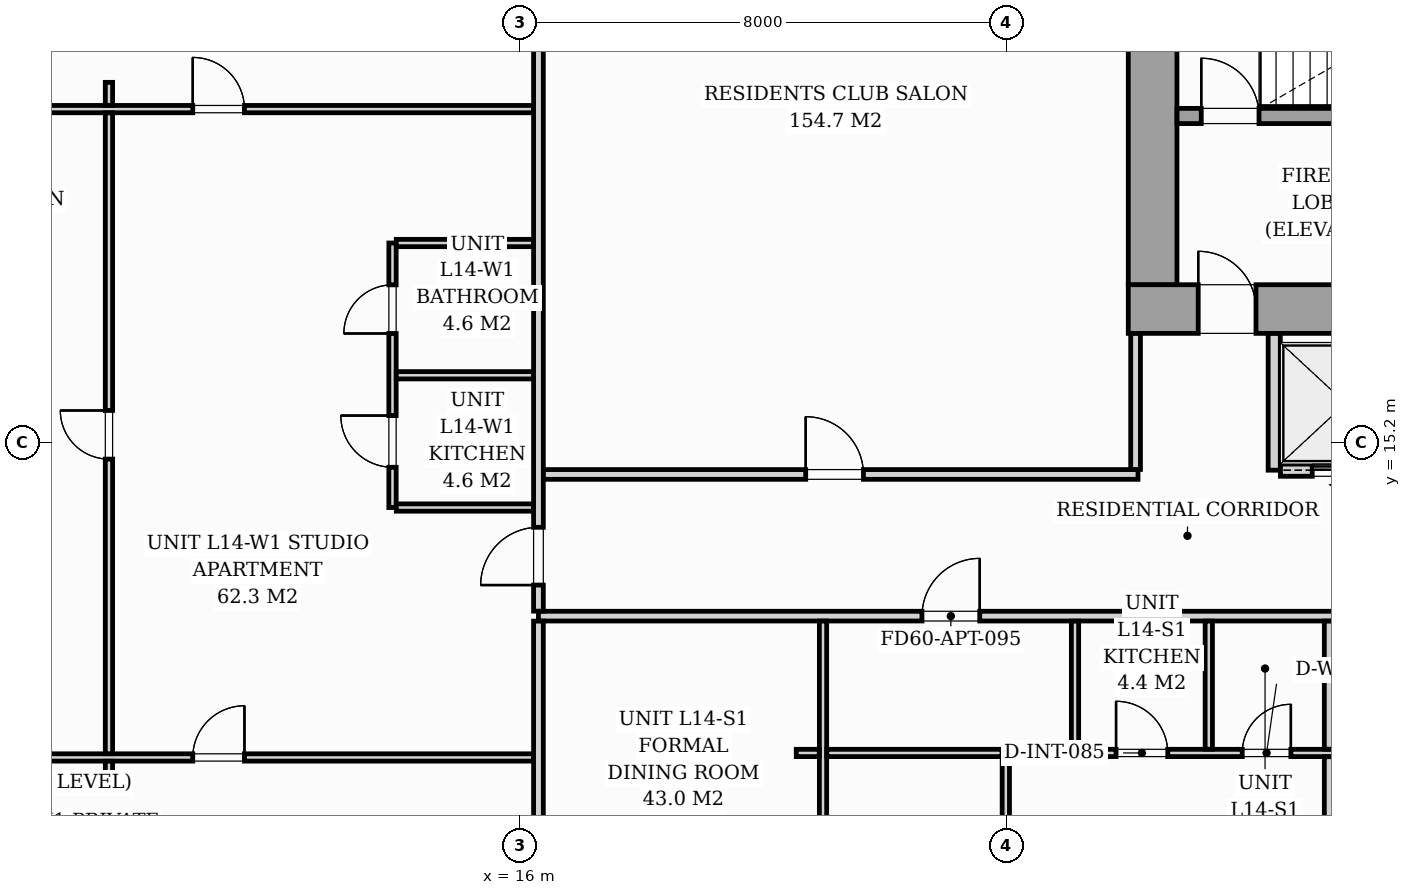
"""IFC4 building model, lengths in metres.
Left out: names, types, materials, properties, quantities, classifications, styles, units other than length and angle.
Written with IfcOpenShell. Run it as: python <this file> out.ifc"""

import sys

from ifc_helpers import new_model, si_unit, direction, frame, frame_2d, origin, origin_2d, place, context, subcontext, project, spatial, rectangle, i_section, extrude, source, transform, mapped, element, fill, save


model = new_model("IFC4")
c1 = context("Model", 3, precision=1e-05, world=origin(), true_north=direction((0.0, 1.0)))
c2 = subcontext(c1, "Body", "Model", "MODEL_VIEW")
j1 = project(units=[si_unit("LENGTHUNIT", "METRE"), si_unit("PLANEANGLEUNIT", "RADIAN")], contexts=[c1])
p1 = place(None, origin())
s1 = spatial("IfcSite", under=j1, at=p1, CompositionType="ELEMENT")
p2 = place(p1, origin())
s2 = spatial("IfcBuilding", under=s1, at=p2, CompositionType="ELEMENT")
p3 = place(p2, frame((0.0, 0.0, 51.8)))
s3 = spatial("IfcBuildingStorey", under=s2, at=p3, CompositionType="ELEMENT", Elevation=51.8)
m1 = source(origin(), c2, "Body", "SweptSolid", [
    extrude(i_section(OverallWidth=0.437, OverallDepth=0.514, WebThickness=0.061, FlangeThickness=0.097, FilletRadius=0.018, at=origin_2d()), origin(), (0.0, 0.0, 1.0), 3.196),
])
p4 = place(p3, frame((26.4, 17.4, 0.002), z_axis=(0.0, 0.0, 1.0), x_axis=(1.0, 0.0, 0.0)))
e1 = element("IfcColumn", 1, at=p4, inside=s3, PredefinedType="PILASTER", context=c2, shape_type="MappedRepresentation", body=[
    mapped(m1, transform((0.0, 0.0, 0.0), scale=1.0)),
])
p5 = place(p3, frame((26.0, 17.4, 0.0), z_axis=(0.0, 0.0, 1.0), x_axis=(1.0, 0.0, 0.0)))
e2 = element("IfcWall", 2, at=p5, inside=s3, PredefinedType="SHEAR", context=c2, shape_type="SweptSolid", body=[
    extrude(rectangle(XDim=20.0, YDim=0.8, at=frame_2d((10.0, 0.0))), origin(), (0.0, 0.0, 1.0), 3.2),
])
p6 = place(p5, frame((1.15, 0.0, 0.0)))
e3 = element("IfcOpeningElement", 3, at=p6, cuts=e2, PredefinedType="OPENING", context=c2, shape_type="SweptSolid", body=[
    extrude(rectangle(XDim=0.95, YDim=2.06, at=frame_2d((0.475, 1.03))), frame((0.0, 0.41, 0.0), z_axis=(0.0, -1.0, 0.0), x_axis=(1.0, 0.0, 0.0)), (0.0, 0.0, 1.0), 0.82),
])
p7 = place(p5, frame((9.58, 0.0, 0.0)))
e4 = element("IfcOpeningElement", 4, at=p7, cuts=e2, PredefinedType="OPENING", context=c2, shape_type="SweptSolid", body=[
    extrude(rectangle(XDim=0.85, YDim=2.0, at=frame_2d((0.425, 1.0))), frame((0.0, 0.41, 0.0), z_axis=(0.0, -1.0, 0.0), x_axis=(1.0, 0.0, 0.0)), (0.0, 0.0, 1.0), 0.82),
])
p8 = place(p5, frame((17.75, 0.0, 0.0)))
e5 = element("IfcOpeningElement", 5, at=p8, cuts=e2, PredefinedType="OPENING", context=c2, shape_type="SweptSolid", body=[
    extrude(rectangle(XDim=0.95, YDim=2.06, at=frame_2d((0.475, 1.03))), frame((0.0, 0.41, 0.0), z_axis=(0.0, -1.0, 0.0), x_axis=(1.0, 0.0, 0.0)), (0.0, 0.0, 1.0), 0.82),
])
p9 = place(p3, frame((26.4, 17.802, 0.0), z_axis=(0.0, 0.0, 1.0), x_axis=(0.0, 1.0, 0.0)))
e6 = element("IfcWall", 6, at=p9, inside=s3, PredefinedType="SHEAR", context=c2, shape_type="SweptSolid", body=[
    extrude(rectangle(XDim=5.796, YDim=0.8, at=frame_2d((2.898, 0.0))), origin(), (0.0, 0.0, 1.0), 3.2),
])
p10 = place(p3, frame((26.802, 20.575, 0.0), z_axis=(0.0, 0.0, 1.0), x_axis=(1.0, 0.0, 0.0)))
e7 = element("IfcWall", 7, at=p10, inside=s3, PredefinedType="SOLIDWALL", context=c2, shape_type="SweptSolid", body=[
    extrude(rectangle(XDim=8.148, YDim=0.25, at=frame_2d((4.074, 0.0))), origin(), (0.0, 0.0, 1.0), 3.2),
])
p11 = place(p10, frame((0.398, 0.0, 0.0)))
e8 = element("IfcOpeningElement", 8, at=p11, cuts=e7, PredefinedType="OPENING", context=c2, shape_type="SweptSolid", body=[
    extrude(rectangle(XDim=0.95, YDim=2.06, at=frame_2d((0.475, 1.03))), frame((0.0, 0.135, 0.0), z_axis=(0.0, -1.0, 0.0), x_axis=(1.0, 0.0, 0.0)), (0.0, 0.0, 1.0), 0.27),
])
p12 = place(p3, frame((28.4, 14.75, 0.0), z_axis=(0.0, 0.0, 1.0), x_axis=(0.0, 1.0, 0.0)))
e9 = element("IfcWall", 9, at=p12, inside=s3, PredefinedType="PARTITIONING", context=c2, shape_type="SweptSolid", body=[
    extrude(rectangle(XDim=2.248, YDim=0.2, at=frame_2d((1.124, 0.0))), origin(), (0.0, 0.0, 1.0), 2.94),
])
p13 = place(p3, frame((28.502, 14.75, 0.0), z_axis=(0.0, 0.0, 1.0), x_axis=(1.0, 0.0, 0.0)))
e10 = element("IfcWall", 10, at=p13, inside=s3, PredefinedType="PARTITIONING", context=c2, shape_type="SweptSolid", body=[
    extrude(rectangle(XDim=2.146, YDim=0.2, at=frame_2d((1.073, 0.0))), origin(), (0.0, 0.0, 1.0), 2.94),
])
p14 = place(p13, frame((0.523, 0.0, 0.0)))
e11 = element("IfcOpeningElement", 11, at=p14, cuts=e10, PredefinedType="OPENING", context=c2, shape_type="SweptSolid", body=[
    extrude(rectangle(XDim=1.05, YDim=2.08, at=frame_2d((0.525, 1.04))), frame((0.0, 0.11, 0.0), z_axis=(0.0, -1.0, 0.0), x_axis=(1.0, 0.0, 0.0)), (0.0, 0.0, 1.0), 0.22),
])
p15 = place(p3, frame((16.3, 12.35, 0.0), z_axis=(0.0, 0.0, 1.0), x_axis=(1.0, 0.0, 0.0)))
e12 = element("IfcWall", 12, at=p15, inside=s3, PredefinedType="PARTITIONING", context=c2, shape_type="SweptSolid", body=[
    extrude(rectangle(XDim=35.2, YDim=0.16, at=frame_2d((17.6, 0.0))), origin(), (0.0, 0.0, 1.0), 2.94),
])
p16 = place(p15, frame((6.307, 0.0, 0.0)))
e13 = element("IfcOpeningElement", 13, at=p16, cuts=e12, PredefinedType="OPENING", context=c2, shape_type="SweptSolid", body=[
    extrude(rectangle(XDim=0.95, YDim=2.06, at=frame_2d((0.475, 1.03))), frame((0.0, 0.09, 0.0), z_axis=(0.0, -1.0, 0.0), x_axis=(1.0, 0.0, 0.0)), (0.0, 0.0, 1.0), 0.18),
])
p17 = place(p15, frame((18.392, 0.0, 0.0)))
e14 = element("IfcOpeningElement", 14, at=p17, cuts=e12, PredefinedType="OPENING", context=c2, shape_type="SweptSolid", body=[
    extrude(rectangle(XDim=0.95, YDim=2.06, at=frame_2d((0.475, 1.03))), frame((0.0, 0.09, 0.0), z_axis=(0.0, -1.0, 0.0), x_axis=(1.0, 0.0, 0.0)), (0.0, 0.0, 1.0), 0.18),
])
p18 = place(p15, frame((29.304, 0.0, 0.0)))
e15 = element("IfcOpeningElement", 15, at=p18, cuts=e12, PredefinedType="OPENING", context=c2, shape_type="SweptSolid", body=[
    extrude(rectangle(XDim=0.95, YDim=2.06, at=frame_2d((0.475, 1.03))), frame((0.0, 0.09, 0.0), z_axis=(0.0, -1.0, 0.0), x_axis=(1.0, 0.0, 0.0)), (0.0, 0.0, 1.0), 0.18),
])
p19 = place(p3, frame((16.3, 2.962, 0.0), z_axis=(0.0, 0.0, 1.0), x_axis=(0.0, 1.0, 0.0)))
e16 = element("IfcWall", 16, at=p19, inside=s3, PredefinedType="PARTITIONING", context=c2, shape_type="SweptSolid", body=[
    extrude(rectangle(XDim=9.306, YDim=0.16, at=frame_2d((4.653, 0.0))), origin(), (0.0, 0.0, 1.0), 2.94),
])
p20 = place(p3, frame((16.3, 12.432, 0.0), z_axis=(0.0, 0.0, 1.0), x_axis=(0.0, 1.0, 0.0)))
e17 = element("IfcWall", 17, at=p20, inside=s3, PredefinedType="PARTITIONING", context=c2, shape_type="SweptSolid", body=[
    extrude(rectangle(XDim=15.006, YDim=0.16, at=frame_2d((7.503, 0.0))), origin(), (0.0, 0.0, 1.0), 2.94),
])
p21 = place(p20, frame((0.429, 0.0, 0.0)))
e18 = element("IfcOpeningElement", 18, at=p21, cuts=e17, PredefinedType="OPENING", context=c2, shape_type="SweptSolid", body=[
    extrude(rectangle(XDim=0.95, YDim=2.06, at=frame_2d((0.475, 1.03))), frame((0.0, 0.09, 0.0), z_axis=(0.0, -1.0, 0.0), x_axis=(1.0, 0.0, 0.0)), (0.0, 0.0, 1.0), 0.18),
])
p22 = place(p3, frame((25.124, 10.1, 0.0), z_axis=(0.0, 0.0, 1.0), x_axis=(1.0, 0.0, 0.0)))
e19 = element("IfcWall", 19, at=p22, inside=s3, PredefinedType="PARTITIONING", context=c2, shape_type="SweptSolid", body=[
    extrude(rectangle(XDim=4.4, YDim=0.12, at=frame_2d((2.2, 0.0))), origin(), (0.0, 0.0, 1.0), 2.94),
])
p23 = place(p22, frame((0.675, 0.0, 0.0)))
e20 = element("IfcOpeningElement", 20, at=p23, cuts=e19, PredefinedType="OPENING", context=c2, shape_type="SweptSolid", body=[
    extrude(rectangle(XDim=0.85, YDim=2.05, at=frame_2d((0.425, 1.025))), frame((0.0, 0.07, 0.0), z_axis=(0.0, -1.0, 0.0), x_axis=(1.0, 0.0, 0.0)), (0.0, 0.0, 1.0), 0.14),
])
p24 = place(p22, frame((2.75, 0.0, 0.0)))
e21 = element("IfcOpeningElement", 21, at=p24, cuts=e19, PredefinedType="OPENING", context=c2, shape_type="SweptSolid", body=[
    extrude(rectangle(XDim=0.8, YDim=2.02, at=frame_2d((0.4, 1.01))), frame((0.0, 0.07, 0.0), z_axis=(0.0, -1.0, 0.0), x_axis=(1.0, 0.0, 0.0)), (0.0, 0.0, 1.0), 0.14),
])
for number, where, z_axis, x_axis in (
    (22, (25.124, 10.162, 0.0), (0.0, 0.0, 1.0), (0.0, 1.0, 0.0)),
    (23, (27.324, 10.162, 0.0), (0.0, 0.0, 1.0), (0.0, 1.0, 0.0)),
):
    element("IfcWall", number, at=place(p3, frame(where, z_axis=z_axis, x_axis=x_axis)), inside=s3, PredefinedType="PARTITIONING", context=c2, shape_type="SweptSolid", body=[
        extrude(rectangle(XDim=2.106, YDim=0.12, at=frame_2d((1.053, 0.0))), origin(), (0.0, 0.0, 1.0), 2.94),
    ])
p25 = place(p3, frame((20.98, 2.962, 0.0), z_axis=(0.0, 0.0, 1.0), x_axis=(0.0, 1.0, 0.0)))
e24 = element("IfcWall", 24, at=p25, inside=s3, PredefinedType="PARTITIONING", context=c2, shape_type="SweptSolid", body=[
    extrude(rectangle(XDim=9.306, YDim=0.12, at=frame_2d((4.653, 0.0))), origin(), (0.0, 0.0, 1.0), 2.94),
])
p26 = place(p25, frame((4.218, 0.0, 0.0)))
e25 = element("IfcOpeningElement", 25, at=p26, cuts=e24, PredefinedType="OPENING", context=c2, shape_type="SweptSolid", body=[
    extrude(rectangle(XDim=0.85, YDim=2.05, at=frame_2d((0.425, 1.025))), frame((0.0, 0.07, 0.0), z_axis=(0.0, -1.0, 0.0), x_axis=(1.0, 0.0, 0.0)), (0.0, 0.0, 1.0), 0.14),
])
p27 = place(p3, frame((23.986, 2.962, 0.0), z_axis=(0.0, 0.0, 1.0), x_axis=(0.0, 1.0, 0.0)))
e26 = element("IfcWall", 26, at=p27, inside=s3, PredefinedType="PARTITIONING", context=c2, shape_type="SweptSolid", body=[
    extrude(rectangle(XDim=7.138, YDim=0.12, at=frame_2d((3.569, 0.0))), origin(), (0.0, 0.0, 1.0), 2.94),
])
p28 = place(p27, frame((3.093, 0.0, 0.0)))
e27 = element("IfcOpeningElement", 27, at=p28, cuts=e26, PredefinedType="OPENING", context=c2, shape_type="SweptSolid", body=[
    extrude(rectangle(XDim=0.85, YDim=2.05, at=frame_2d((0.425, 1.025))), frame((0.0, 0.07, 0.0), z_axis=(0.0, -1.0, 0.0), x_axis=(1.0, 0.0, 0.0)), (0.0, 0.0, 1.0), 0.14),
])
p29 = place(p3, frame((20.54, 10.1, 0.0), z_axis=(0.0, 0.0, 1.0), x_axis=(1.0, 0.0, 0.0)))
e28 = element("IfcWall", 28, at=p29, inside=s3, PredefinedType="PARTITIONING", context=c2, shape_type="SweptSolid", body=[
    extrude(rectangle(XDim=0.378, YDim=0.12, at=frame_2d((0.189, 0.0))), origin(), (0.0, 0.0, 1.0), 2.94),
])
p30 = place(p3, frame((21.042, 10.1, 0.0), z_axis=(0.0, 0.0, 1.0), x_axis=(1.0, 0.0, 0.0)))
e29 = element("IfcWall", 29, at=p30, inside=s3, PredefinedType="PARTITIONING", context=c2, shape_type="SweptSolid", body=[
    extrude(rectangle(XDim=2.882, YDim=0.12, at=frame_2d((1.441, 0.0))), origin(), (0.0, 0.0, 1.0), 2.94),
])
p31 = place(p3, frame((29.324, 2.78, 0.0), z_axis=(0.0, 0.0, 1.0), x_axis=(0.0, 1.0, 0.0)))
e30 = element("IfcWall", 30, at=p31, inside=s3, PredefinedType="PARTITIONING", context=c2, shape_type="SweptSolid", body=[
    extrude(rectangle(XDim=7.258, YDim=0.2, at=frame_2d((3.629, 0.0))), origin(), (0.0, 0.0, 1.0), 2.94),
])
p32 = place(p3, frame((29.324, 10.162, 0.0), z_axis=(0.0, 0.0, 1.0), x_axis=(0.0, 1.0, 0.0)))
e31 = element("IfcWall", 31, at=p32, inside=s3, PredefinedType="PARTITIONING", context=c2, shape_type="SweptSolid", body=[
    extrude(rectangle(XDim=2.106, YDim=0.2, at=frame_2d((1.053, 0.0))), origin(), (0.0, 0.0, 1.0), 2.94),
])
p33 = place(p3, frame((13.9, 14.136, 0.0), z_axis=(0.0, 0.0, 1.0), x_axis=(0.0, 1.0, 0.0)))
e32 = element("IfcWall", 32, at=p33, inside=s3, PredefinedType="PARTITIONING", context=c2, shape_type="SweptSolid", body=[
    extrude(rectangle(XDim=4.35, YDim=0.12, at=frame_2d((2.175, 0.0))), origin(), (0.0, 0.0, 1.0), 2.94),
])
p34 = place(p33, frame((0.662, 0.0, 0.0)))
e33 = element("IfcOpeningElement", 33, at=p34, cuts=e32, PredefinedType="OPENING", context=c2, shape_type="SweptSolid", body=[
    extrude(rectangle(XDim=0.85, YDim=2.05, at=frame_2d((0.425, 1.025))), frame((0.0, 0.07, 0.0), z_axis=(0.0, -1.0, 0.0), x_axis=(1.0, 0.0, 0.0)), (0.0, 0.0, 1.0), 0.14),
])
p35 = place(p33, frame((2.862, 0.0, 0.0)))
e34 = element("IfcOpeningElement", 34, at=p35, cuts=e32, PredefinedType="OPENING", context=c2, shape_type="SweptSolid", body=[
    extrude(rectangle(XDim=0.8, YDim=2.02, at=frame_2d((0.4, 1.01))), frame((0.0, 0.07, 0.0), z_axis=(0.0, -1.0, 0.0), x_axis=(1.0, 0.0, 0.0)), (0.0, 0.0, 1.0), 0.14),
])
p36 = place(p3, frame((13.962, 16.311, 0.0), z_axis=(0.0, 0.0, 1.0), x_axis=(1.0, 0.0, 0.0)))
e35 = element("IfcWall", 35, at=p36, inside=s3, PredefinedType="PARTITIONING", context=c2, shape_type="SweptSolid", body=[
    extrude(rectangle(XDim=2.256, YDim=0.12, at=frame_2d((1.128, 0.0))), origin(), (0.0, 0.0, 1.0), 2.045),
])
for number, where, z_axis, x_axis in (
    (36, (13.962, 14.136, 0.0), (0.0, 0.0, 1.0), (1.0, 0.0, 0.0)),
    (37, (13.962, 18.486, 0.0), (0.0, 0.0, 1.0), (1.0, 0.0, 0.0)),
):
    element("IfcWall", number, at=place(p3, frame(where, z_axis=z_axis, x_axis=x_axis)), inside=s3, PredefinedType="PARTITIONING", context=c2, shape_type="SweptSolid", body=[
        extrude(rectangle(XDim=2.256, YDim=0.12, at=frame_2d((1.128, 0.0))), origin(), (0.0, 0.0, 1.0), 2.94),
    ])
p37 = place(p3, frame((5.88, 10.026, 0.0), z_axis=(0.0, 0.0, 1.0), x_axis=(1.0, 0.0, 0.0)))
e38 = element("IfcWall", 38, at=p37, inside=s3, PredefinedType="PARTITIONING", context=c2, shape_type="SweptSolid", body=[
    extrude(rectangle(XDim=10.338, YDim=0.12, at=frame_2d((5.169, 0.0))), origin(), (0.0, 0.0, 1.0), 2.94),
])
p38 = place(p37, frame((4.735, 0.0, 0.0)))
e39 = element("IfcOpeningElement", 39, at=p38, cuts=e38, PredefinedType="OPENING", context=c2, shape_type="SweptSolid", body=[
    extrude(rectangle(XDim=0.85, YDim=2.05, at=frame_2d((0.425, 1.025))), frame((0.0, 0.07, 0.0), z_axis=(0.0, -1.0, 0.0), x_axis=(1.0, 0.0, 0.0)), (0.0, 0.0, 1.0), 0.14),
])
p39 = place(p3, frame((5.88, 20.688, 0.0), z_axis=(0.0, 0.0, 1.0), x_axis=(1.0, 0.0, 0.0)))
e40 = element("IfcWall", 40, at=p39, inside=s3, PredefinedType="PARTITIONING", context=c2, shape_type="SweptSolid", body=[
    extrude(rectangle(XDim=10.338, YDim=0.12, at=frame_2d((5.169, 0.0))), origin(), (0.0, 0.0, 1.0), 2.94),
])
p40 = place(p39, frame((4.735, 0.0, 0.0)))
e41 = element("IfcOpeningElement", 41, at=p40, cuts=e40, PredefinedType="OPENING", context=c2, shape_type="SweptSolid", body=[
    extrude(rectangle(XDim=0.85, YDim=2.05, at=frame_2d((0.425, 1.025))), frame((0.0, 0.07, 0.0), z_axis=(0.0, -1.0, 0.0), x_axis=(1.0, 0.0, 0.0)), (0.0, 0.0, 1.0), 0.14),
])
p41 = place(p3, frame((9.237, 9.586, 0.0), z_axis=(0.0, 0.0, 1.0), x_axis=(0.0, 1.0, 0.0)))
e42 = element("IfcWall", 42, at=p41, inside=s3, PredefinedType="PARTITIONING", context=c2, shape_type="SweptSolid", body=[
    extrude(rectangle(XDim=0.378, YDim=0.12, at=frame_2d((0.189, 0.0))), origin(), (0.0, 0.0, 1.0), 2.94),
])
p42 = place(p3, frame((9.237, 10.088, 0.0), z_axis=(0.0, 0.0, 1.0), x_axis=(0.0, 1.0, 0.0)))
e43 = element("IfcWall", 43, at=p42, inside=s3, PredefinedType="PARTITIONING", context=c2, shape_type="SweptSolid", body=[
    extrude(rectangle(XDim=10.538, YDim=0.12, at=frame_2d((5.269, 0.0))), origin(), (0.0, 0.0, 1.0), 2.94),
])
p43 = place(p42, frame((4.844, 0.0, 0.0)))
e44 = element("IfcOpeningElement", 44, at=p43, cuts=e43, PredefinedType="OPENING", context=c2, shape_type="SweptSolid", body=[
    extrude(rectangle(XDim=0.8, YDim=2.0, at=frame_2d((0.4, 1.0))), frame((0.0, 0.07, 0.0), z_axis=(0.0, -1.0, 0.0), x_axis=(1.0, 0.0, 0.0)), (0.0, 0.0, 1.0), 0.14),
])
p44 = place(p3, frame((9.237, 20.75, 0.0), z_axis=(0.0, 0.0, 1.0), x_axis=(0.0, 1.0, 0.0)))
e45 = element("IfcWall", 45, at=p44, inside=s3, PredefinedType="PARTITIONING", context=c2, shape_type="SweptSolid", body=[
    extrude(rectangle(XDim=0.378, YDim=0.12, at=frame_2d((0.189, 0.0))), origin(), (0.0, 0.0, 1.0), 2.94),
])
p45 = place(p3, frame((16.382, 14.68, 0.0), z_axis=(0.0, 0.0, 1.0), x_axis=(1.0, 0.0, 0.0)))
e46 = element("IfcWall", 46, at=p45, inside=s3, PredefinedType="PARTITIONING", context=c2, shape_type="SweptSolid", body=[
    extrude(rectangle(XDim=9.778, YDim=0.16, at=frame_2d((4.889, 0.0))), origin(), (0.0, 0.0, 1.0), 2.94),
])
p46 = place(p45, frame((4.313, 0.0, 0.0)))
e47 = element("IfcOpeningElement", 47, at=p46, cuts=e46, PredefinedType="OPENING", context=c2, shape_type="SweptSolid", body=[
    extrude(rectangle(XDim=0.95, YDim=2.06, at=frame_2d((0.475, 1.03))), frame((0.0, 0.09, 0.0), z_axis=(0.0, -1.0, 0.0), x_axis=(1.0, 0.0, 0.0)), (0.0, 0.0, 1.0), 0.18),
])
p47 = place(p3, frame((26.12, 14.762, 0.0), z_axis=(0.0, 0.0, 1.0), x_axis=(0.0, 1.0, 0.0)))
e48 = element("IfcWall", 48, at=p47, inside=s3, PredefinedType="PARTITIONING", context=c2, shape_type="SweptSolid", body=[
    extrude(rectangle(XDim=2.236, YDim=0.16, at=frame_2d((1.118, 0.0))), origin(), (0.0, 0.0, 1.0), 2.94),
])
m2 = source(origin(), c2, "Body", "SweptSolid", [
    extrude(rectangle(XDim=0.95, YDim=2.06, at=frame_2d((0.475, 1.03))), frame((0.0, 0.025, 0.0), z_axis=(0.0, -1.0, 0.0), x_axis=(1.0, 0.0, 0.0)), (0.0, 0.0, 1.0), 0.05),
])
p48 = place(p6, origin())
e49 = element("IfcDoor", 49, at=p48, inside=s3, OperationType="SINGLE_SWING_LEFT", PredefinedType="DOOR", context=c2, shape_type="MappedRepresentation", body=[
    mapped(m2, transform((0.0, 0.0, 0.0), scale=1.0)),
])
fill(e3, e49)
p49 = place(p11, origin())
e50 = element("IfcDoor", 50, at=p49, inside=s3, OperationType="SINGLE_SWING_LEFT", PredefinedType="DOOR", context=c2, shape_type="MappedRepresentation", body=[
    mapped(m2, transform((0.0, 0.0, 0.0), scale=1.0)),
])
fill(e8, e50)
m3 = source(origin(), c2, "Body", "SweptSolid", [
    extrude(rectangle(XDim=1.05, YDim=2.08, at=frame_2d((0.525, 1.04))), frame((0.0, 0.025, 0.0), z_axis=(0.0, -1.0, 0.0), x_axis=(1.0, 0.0, 0.0)), (0.0, 0.0, 1.0), 0.05),
])
p50 = place(p14, origin())
e51 = element("IfcDoor", 51, at=p50, inside=s3, OperationType="SLIDING_TO_LEFT", PredefinedType="DOOR", context=c2, shape_type="MappedRepresentation", body=[
    mapped(m3, transform((0.0, 0.0, 0.0), scale=1.0)),
])
fill(e11, e51)
m4 = source(origin(), c2, "Body", "SweptSolid", [
    extrude(rectangle(XDim=0.95, YDim=2.06, at=frame_2d((0.475, 1.03))), frame((0.0, 0.025, 0.0), z_axis=(0.0, -1.0, 0.0), x_axis=(1.0, 0.0, 0.0)), (0.0, 0.0, 1.0), 0.05),
])
p51 = place(p16, origin())
e52 = element("IfcDoor", 52, at=p51, inside=s3, OperationType="SINGLE_SWING_RIGHT", PredefinedType="DOOR", context=c2, shape_type="MappedRepresentation", body=[
    mapped(m4, transform((0.0, 0.0, 0.0), scale=1.0)),
])
fill(e13, e52)
m5 = source(origin(), c2, "Body", "SweptSolid", [
    extrude(rectangle(XDim=0.85, YDim=2.05, at=frame_2d((0.425, 1.025))), frame((0.0, 0.025, 0.0), z_axis=(0.0, -1.0, 0.0), x_axis=(1.0, 0.0, 0.0)), (0.0, 0.0, 1.0), 0.05),
])
p52 = place(p23, origin())
e53 = element("IfcDoor", 53, at=p52, inside=s3, OperationType="SINGLE_SWING_LEFT", PredefinedType="DOOR", context=c2, shape_type="MappedRepresentation", body=[
    mapped(m5, transform((0.0, 0.0, 0.0), scale=1.0)),
])
fill(e20, e53)
m6 = source(origin(), c2, "Body", "SweptSolid", [
    extrude(rectangle(XDim=0.8, YDim=2.02, at=frame_2d((0.4, 1.01))), frame((0.0, 0.025, 0.0), z_axis=(0.0, -1.0, 0.0), x_axis=(1.0, 0.0, 0.0)), (0.0, 0.0, 1.0), 0.05),
])
p53 = place(p24, origin())
e54 = element("IfcDoor", 54, at=p53, inside=s3, OperationType="SINGLE_SWING_RIGHT", PredefinedType="DOOR", context=c2, shape_type="MappedRepresentation", body=[
    mapped(m6, transform((0.0, 0.0, 0.0), scale=1.0)),
])
fill(e21, e54)
p54 = place(p21, origin())
e55 = element("IfcDoor", 55, at=p54, inside=s3, OperationType="SINGLE_SWING_LEFT", PredefinedType="DOOR", context=c2, shape_type="MappedRepresentation", body=[
    mapped(m4, transform((0.0, 0.0, 0.0), scale=1.0)),
])
fill(e18, e55)
p55 = place(p34, origin())
e56 = element("IfcDoor", 56, at=p55, inside=s3, OperationType="SINGLE_SWING_RIGHT", PredefinedType="DOOR", context=c2, shape_type="MappedRepresentation", body=[
    mapped(m5, transform((0.0, 0.0, 0.0), scale=1.0)),
])
fill(e33, e56)
p56 = place(p35, origin())
e57 = element("IfcDoor", 57, at=p56, inside=s3, OperationType="SINGLE_SWING_LEFT", PredefinedType="DOOR", context=c2, shape_type="MappedRepresentation", body=[
    mapped(m6, transform((0.0, 0.0, 0.0), scale=1.0)),
])
fill(e34, e57)
p57 = place(p38, origin())
e58 = element("IfcDoor", 58, at=p57, inside=s3, OperationType="SINGLE_SWING_RIGHT", PredefinedType="DOOR", context=c2, shape_type="MappedRepresentation", body=[
    mapped(m5, transform((0.0, 0.0, 0.0), scale=1.0)),
])
fill(e39, e58)
p58 = place(p40, origin())
e59 = element("IfcDoor", 59, at=p58, inside=s3, OperationType="SINGLE_SWING_LEFT", PredefinedType="DOOR", context=c2, shape_type="MappedRepresentation", body=[
    mapped(m5, transform((0.0, 0.0, 0.0), scale=1.0)),
])
fill(e41, e59)
m7 = source(origin(), c2, "Body", "SweptSolid", [
    extrude(rectangle(XDim=0.8, YDim=2.0, at=frame_2d((0.4, 1.0))), frame((0.0, 0.025, 0.0), z_axis=(0.0, -1.0, 0.0), x_axis=(1.0, 0.0, 0.0)), (0.0, 0.0, 1.0), 0.05),
])
p59 = place(p43, origin())
e60 = element("IfcDoor", 60, at=p59, inside=s3, OperationType="SINGLE_SWING_RIGHT", PredefinedType="DOOR", context=c2, shape_type="MappedRepresentation", body=[
    mapped(m7, transform((0.0, 0.0, 0.0), scale=1.0)),
])
fill(e44, e60)
p60 = place(p46, origin())
e61 = element("IfcDoor", 61, at=p60, inside=s3, OperationType="SINGLE_SWING_LEFT", PredefinedType="DOOR", context=c2, shape_type="MappedRepresentation", body=[
    mapped(m4, transform((0.0, 0.0, 0.0), scale=1.0)),
])
fill(e47, e61)
save(model, sys.argv[1])
